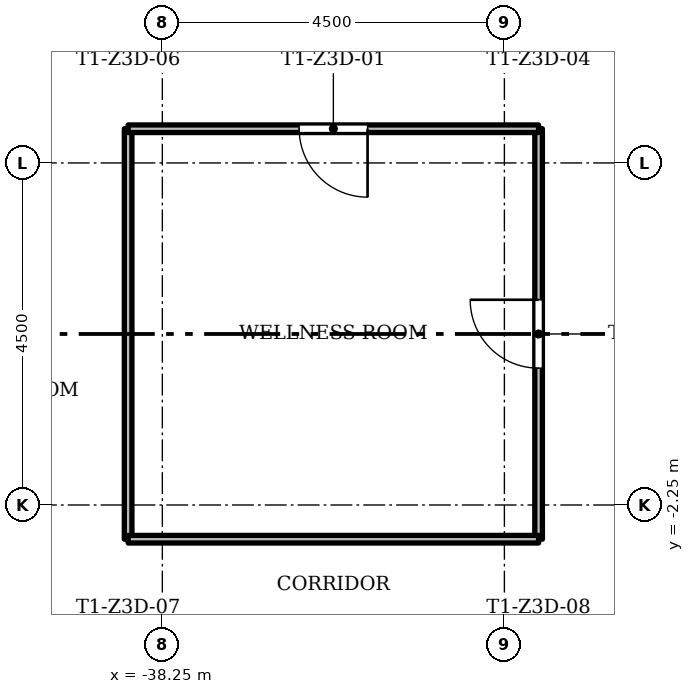
"""IFC4 building model, lengths in metres.
Left out: names, types, materials, properties, quantities, classifications, styles, units other than length and angle.
Written with IfcOpenShell. Run it as: python <this file> out.ifc"""

import sys

from ifc_helpers import new_model, si_unit, direction, frame, frame_2d, origin, place, context, subcontext, project, spatial, rectangle, extrude, element, fill, save


model = new_model("IFC4")
c1 = context("Model", 3, precision=1e-05, world=origin(), true_north=direction((0.0, 1.0)))
c2 = subcontext(c1, "Body", "Model", "MODEL_VIEW")
j1 = project(units=[si_unit("LENGTHUNIT", "METRE"), si_unit("PLANEANGLEUNIT", "RADIAN")], contexts=[c1])
p1 = place(None, origin())
s1 = spatial("IfcSite", under=j1, at=p1, CompositionType="ELEMENT")
p2 = place(p1, origin())
s2 = spatial("IfcBuilding", under=s1, at=p2, CompositionType="ELEMENT")
p3 = place(p2, frame((0.0, 0.0, 174.5)))
s3 = spatial("IfcBuildingStorey", under=s2, at=p3, CompositionType="ELEMENT", Elevation=174.5)
p4 = place(p3, frame((-38.7, -2.7, 0.0), z_axis=(0.0, 0.0, 1.0), x_axis=(0.0, 1.0, 0.0)))
e1 = element("IfcWall", 1, at=p4, inside=s3, PredefinedType="PARTITIONING", context=c2, shape_type="SweptSolid", body=[
    extrude(rectangle(XDim=5.4, YDim=0.1, at=frame_2d((2.7, 0.0))), origin(), (0.0, 0.0, 1.0), 3.0),
])
p5 = place(p3, frame((-33.3, -2.7, 0.0), z_axis=(0.0, 0.0, 1.0), x_axis=(0.0, 1.0, 0.0)))
e2 = element("IfcWall", 2, at=p5, inside=s3, PredefinedType="PARTITIONING", context=c2, shape_type="SweptSolid", body=[
    extrude(rectangle(XDim=5.4, YDim=0.1, at=frame_2d((2.7, 0.0))), origin(), (0.0, 0.0, 1.0), 3.0),
])
p6 = place(p5, frame((2.25, 0.0, 0.0)))
e3 = element("IfcOpeningElement", 3, at=p6, cuts=e2, PredefinedType="OPENING", context=c2, shape_type="SweptSolid", body=[
    extrude(rectangle(XDim=0.9, YDim=2.1, at=frame_2d((0.45, 1.05))), frame((0.0, 0.06, 0.0), z_axis=(0.0, -1.0, 0.0), x_axis=(1.0, 0.0, 0.0)), (0.0, 0.0, 1.0), 0.12),
])
p7 = place(p3, frame((-38.7, -2.7, 0.0), z_axis=(0.0, 0.0, 1.0), x_axis=(1.0, 0.0, 0.0)))
e4 = element("IfcWall", 4, at=p7, inside=s3, PredefinedType="PARTITIONING", context=c2, shape_type="SweptSolid", body=[
    extrude(rectangle(XDim=5.4, YDim=0.1, at=frame_2d((2.7, 0.0))), origin(), (0.0, 0.0, 1.0), 3.0),
])
p8 = place(p3, frame((-38.7, 2.7, 0.0), z_axis=(0.0, 0.0, 1.0), x_axis=(1.0, 0.0, 0.0)))
e5 = element("IfcWall", 5, at=p8, inside=s3, PredefinedType="PARTITIONING", context=c2, shape_type="SweptSolid", body=[
    extrude(rectangle(XDim=5.4, YDim=0.1, at=frame_2d((2.7, 0.0))), origin(), (0.0, 0.0, 1.0), 3.0),
])
p9 = place(p8, frame((2.25, 0.0, 0.0)))
e6 = element("IfcOpeningElement", 6, at=p9, cuts=e5, PredefinedType="OPENING", context=c2, shape_type="SweptSolid", body=[
    extrude(rectangle(XDim=0.9, YDim=2.1, at=frame_2d((0.45, 1.05))), frame((0.0, 0.06, 0.0), z_axis=(0.0, -1.0, 0.0), x_axis=(1.0, 0.0, 0.0)), (0.0, 0.0, 1.0), 0.12),
])
p10 = place(p9, origin())
e7 = element("IfcDoor", 7, at=p10, inside=s3, OperationType="SINGLE_SWING_RIGHT", PredefinedType="DOOR", context=c2, shape_type="SweptSolid", body=[
    extrude(rectangle(XDim=0.9, YDim=2.1, at=frame_2d((0.45, 1.05))), frame((0.0, 0.025, 0.0), z_axis=(0.0, -1.0, 0.0), x_axis=(1.0, 0.0, 0.0)), (0.0, 0.0, 1.0), 0.05),
])
fill(e6, e7)
p11 = place(p6, origin())
e8 = element("IfcDoor", 8, at=p11, inside=s3, OperationType="SINGLE_SWING_LEFT", PredefinedType="DOOR", context=c2, shape_type="SweptSolid", body=[
    extrude(rectangle(XDim=0.9, YDim=2.1, at=frame_2d((0.45, 1.05))), frame((0.0, 0.025, 0.0), z_axis=(0.0, -1.0, 0.0), x_axis=(1.0, 0.0, 0.0)), (0.0, 0.0, 1.0), 0.05),
])
fill(e3, e8)
save(model, sys.argv[1])
